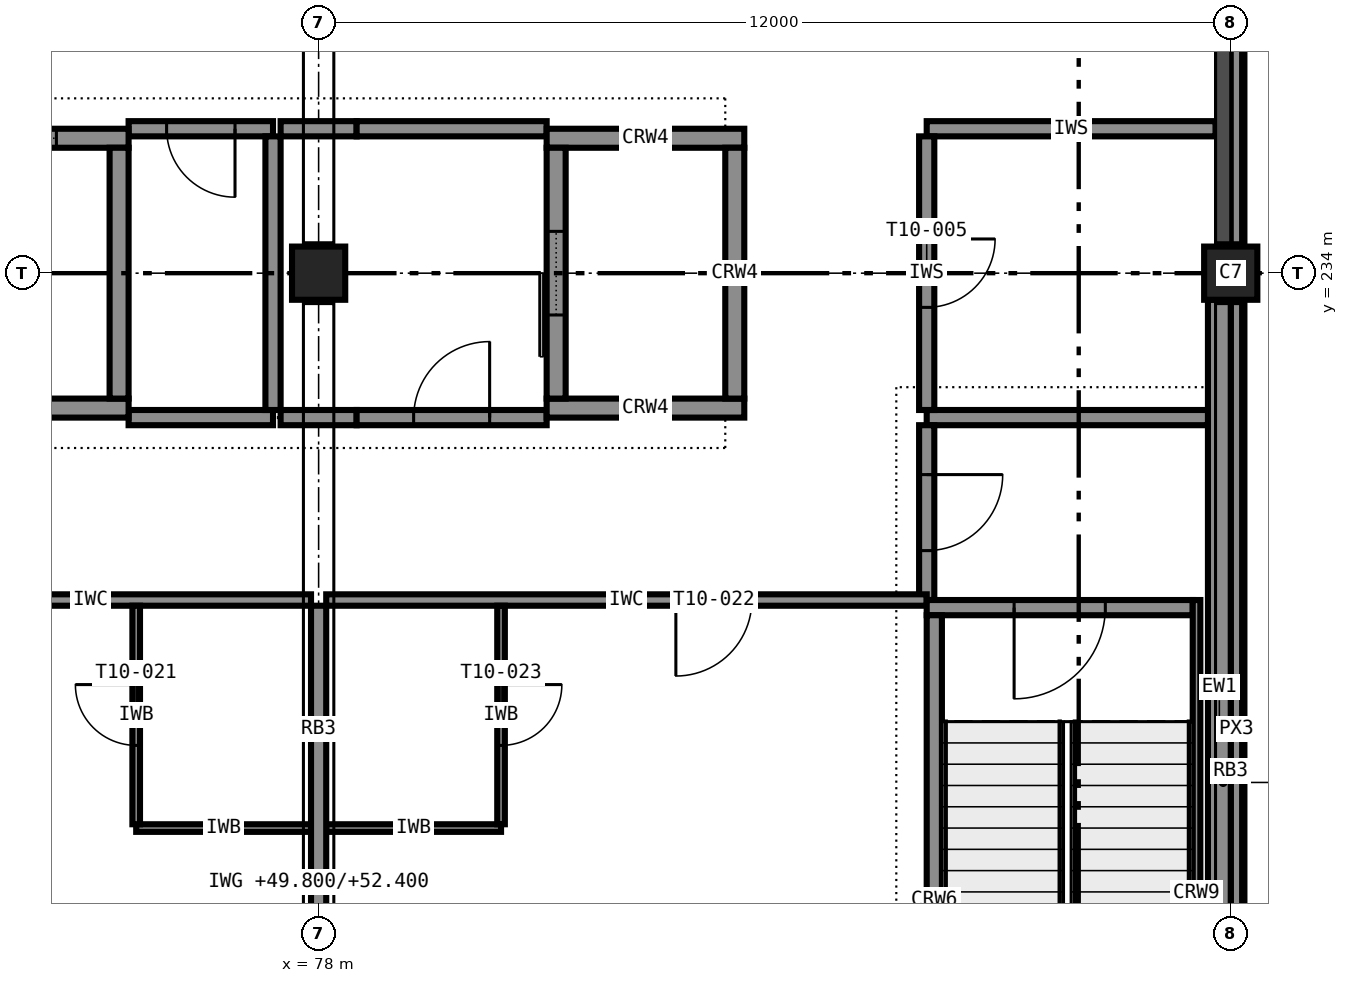
"""IFC4 building model, lengths in metres.
Left out: names, types, materials, properties, quantities, classifications, styles, units other than length and angle.
Written with IfcOpenShell. Run it as: python <this file> out.ifc"""

import sys

from ifc_helpers import new_model, si_unit, direction, frame, frame_2d, origin, origin_2d, place, context, subcontext, project, spatial, rectangle, extrude, element, fill, save


model = new_model("IFC4")
c1 = context("Model", 3, precision=1e-05, world=origin(), true_north=direction((0.0, 1.0)))
c2 = subcontext(c1, "Body", "Model", "MODEL_VIEW")
j1 = project(units=[si_unit("LENGTHUNIT", "METRE"), si_unit("PLANEANGLEUNIT", "RADIAN")], contexts=[c1])
p1 = place(None, origin())
s1 = spatial("IfcSite", under=j1, at=p1, CompositionType="ELEMENT")
p2 = place(p1, origin())
s2 = spatial("IfcBuilding", under=s1, at=p2, CompositionType="ELEMENT")
p3 = place(p2, frame((0.0, 0.0, 49.8)))
s3 = spatial("IfcBuildingStorey", under=s2, at=p3, CompositionType="ELEMENT", Elevation=49.8)
for number, where, z_axis, x_axis in (
    (1, (78.0, 234.0, 0.0), (0.0, 0.0, 1.0), (1.0, 0.0, 0.0)),
    (2, (90.0, 234.0, 0.0), (0.0, 0.0, 1.0), (1.0, 0.0, 0.0)),
):
    element("IfcColumn", number, at=place(p3, frame(where, z_axis=z_axis, x_axis=x_axis)), inside=s3, PredefinedType="COLUMN", context=c2, shape_type="SweptSolid", body=[
        extrude(rectangle(XDim=0.7, YDim=0.7, at=origin_2d()), origin(), (0.0, 0.0, 1.0), 3.6),
    ])
p4 = place(p3, frame((72.5, 232.225, 0.0), z_axis=(0.0, 0.0, 1.0), x_axis=(1.0, 0.0, 0.0)))
e3 = element("IfcWall", 3, at=p4, inside=s3, PredefinedType="SHEAR", context=c2, shape_type="SweptSolid", body=[
    extrude(rectangle(XDim=3.0, YDim=0.25, at=frame_2d((1.5, 0.0))), origin(), (0.0, 0.0, 1.0), 3.6),
])
p5 = place(p3, frame((72.5, 235.775, 0.0), z_axis=(0.0, 0.0, 1.0), x_axis=(1.0, 0.0, 0.0)))
e4 = element("IfcWall", 4, at=p5, inside=s3, PredefinedType="SHEAR", context=c2, shape_type="SweptSolid", body=[
    extrude(rectangle(XDim=3.0, YDim=0.25, at=frame_2d((1.5, 0.0))), origin(), (0.0, 0.0, 1.0), 3.6),
])
p6 = place(p5, frame((0.95, 0.0, 0.0)))
e5 = element("IfcOpeningElement", 5, at=p6, cuts=e4, PredefinedType="OPENING", context=c2, shape_type="SweptSolid", body=[
    extrude(rectangle(XDim=1.1, YDim=2.1, at=frame_2d((0.55, 1.05))), frame((0.0, 0.135, 0.0), z_axis=(0.0, -1.0, 0.0), x_axis=(1.0, 0.0, 0.0)), (0.0, 0.0, 1.0), 0.27),
])
p7 = place(p3, frame((75.375, 232.35, 0.0), z_axis=(0.0, 0.0, 1.0), x_axis=(0.0, 1.0, 0.0)))
e6 = element("IfcWall", 6, at=p7, inside=s3, PredefinedType="SHEAR", context=c2, shape_type="SweptSolid", body=[
    extrude(rectangle(XDim=3.3, YDim=0.25, at=frame_2d((1.65, 0.0))), origin(), (0.0, 0.0, 1.0), 3.6),
])
for number, where, z_axis, x_axis in (
    (7, (81.0, 232.225, 0.0), (0.0, 0.0, 1.0), (1.0, 0.0, 0.0)),
    (8, (81.0, 235.775, 0.0), (0.0, 0.0, 1.0), (1.0, 0.0, 0.0)),
):
    element("IfcWall", number, at=place(p3, frame(where, z_axis=z_axis, x_axis=x_axis)), inside=s3, PredefinedType="SHEAR", context=c2, shape_type="SweptSolid", body=[
        extrude(rectangle(XDim=2.6, YDim=0.25, at=frame_2d((1.3, 0.0))), origin(), (0.0, 0.0, 1.0), 3.6),
    ])
p8 = place(p3, frame((81.125, 232.35, 0.0), z_axis=(0.0, 0.0, 1.0), x_axis=(0.0, 1.0, 0.0)))
e9 = element("IfcWall", 9, at=p8, inside=s3, PredefinedType="SHEAR", context=c2, shape_type="SweptSolid", body=[
    extrude(rectangle(XDim=3.3, YDim=0.25, at=frame_2d((1.65, 0.0))), origin(), (0.0, 0.0, 1.0), 3.6),
])
p9 = place(p8, frame((1.1, 0.0, 0.0)))
e10 = element("IfcOpeningElement", 10, at=p9, cuts=e9, PredefinedType="OPENING", context=c2, shape_type="SweptSolid", body=[
    extrude(rectangle(XDim=1.1, YDim=2.1, at=frame_2d((0.55, 1.05))), frame((0.0, 0.135, 0.0), z_axis=(0.0, -1.0, 0.0), x_axis=(1.0, 0.0, 0.0)), (0.0, 0.0, 1.0), 0.27),
])
p10 = place(p3, frame((83.475, 232.35, 0.0), z_axis=(0.0, 0.0, 1.0), x_axis=(0.0, 1.0, 0.0)))
e11 = element("IfcWall", 11, at=p10, inside=s3, PredefinedType="SHEAR", context=c2, shape_type="SweptSolid", body=[
    extrude(rectangle(XDim=3.3, YDim=0.25, at=frame_2d((1.65, 0.0))), origin(), (0.0, 0.0, 1.0), 3.6),
])
p11 = place(p3, frame((89.5, 229.6, 0.0), z_axis=(0.0, 0.0, 1.0), x_axis=(-1.0, 0.0, 0.0)))
e12 = element("IfcWall", 12, at=p11, inside=s3, PredefinedType="SHEAR", context=c2, shape_type="SweptSolid", body=[
    extrude(rectangle(XDim=3.5, YDim=0.2, at=frame_2d((1.75, 0.0))), origin(), (0.0, 0.0, 1.0), 3.6),
])
p12 = place(p11, frame((1.15, 0.0, 0.0)))
e13 = element("IfcOpeningElement", 13, at=p12, cuts=e12, PredefinedType="OPENING", context=c2, shape_type="SweptSolid", body=[
    extrude(rectangle(XDim=1.2, YDim=2.1, at=frame_2d((0.6, 1.05))), frame((0.0, 0.11, 0.0), z_axis=(0.0, -1.0, 0.0), x_axis=(1.0, 0.0, 0.0)), (0.0, 0.0, 1.0), 0.22),
])
p13 = place(p3, frame((86.1, 222.0, 0.0), z_axis=(0.0, 0.0, 1.0), x_axis=(0.0, 1.0, 0.0)))
e14 = element("IfcWall", 14, at=p13, inside=s3, PredefinedType="SHEAR", context=c2, shape_type="SweptSolid", body=[
    extrude(rectangle(XDim=7.5, YDim=0.2, at=frame_2d((3.75, 0.0))), origin(), (0.0, 0.0, 1.0), 3.6),
])
p14 = place(p3, frame((89.55, 229.7, 0.0), z_axis=(0.0, 0.0, 1.0), x_axis=(0.0, -1.0, 0.0)))
e15 = element("IfcWall", 15, at=p14, inside=s3, PredefinedType="SHEAR", context=c2, shape_type="SweptSolid", body=[
    extrude(rectangle(XDim=7.7, YDim=0.1, at=frame_2d((3.85, 0.0))), origin(), (0.0, 0.0, 1.0), 3.4),
])
p15 = place(p3, frame((89.85, 222.35, 0.0), z_axis=(0.0, 0.0, 1.0), x_axis=(0.0, 1.0, 0.0)))
e16 = element("IfcWall", 16, at=p15, inside=s3, PredefinedType="STANDARD", context=c2, shape_type="SweptSolid", body=[
    extrude(rectangle(XDim=11.3, YDim=0.3, at=frame_2d((5.65, 0.0))), origin(), (0.0, 0.0, 1.0), 2.6),
])
for number, where, z_axis, x_axis in (
    (17, (90.075, 222.35, 3.4), (0.0, 0.0, 1.0), (0.0, 1.0, 0.0)),
    (18, (90.075, 234.35, 3.4), (0.0, 0.0, 1.0), (0.0, 1.0, 0.0)),
):
    element("IfcWall", number, at=place(p3, frame(where, z_axis=z_axis, x_axis=x_axis)), inside=s3, PredefinedType="STANDARD", context=c2, shape_type="SweptSolid", body=[
        extrude(rectangle(XDim=11.3, YDim=0.15, at=frame_2d((5.65, 0.0))), origin(), (0.0, 0.0, 1.0), 0.2),
    ])
p16 = place(p3, frame((75.5, 232.1, 0.0), z_axis=(0.0, 0.0, 1.0), x_axis=(1.0, 0.0, 0.0)))
e19 = element("IfcWall", 19, at=p16, inside=s3, PredefinedType="PARTITIONING", context=c2, shape_type="SweptSolid", body=[
    extrude(rectangle(XDim=1.9, YDim=0.2, at=frame_2d((0.95, 0.0))), origin(), (0.0, 0.0, 1.0), 3.4),
])
p17 = place(p3, frame((77.5, 232.1, 0.0), z_axis=(0.0, 0.0, 1.0), x_axis=(1.0, 0.0, 0.0)))
e20 = element("IfcWall", 20, at=p17, inside=s3, PredefinedType="PARTITIONING", context=c2, shape_type="SweptSolid", body=[
    extrude(rectangle(XDim=1.0, YDim=0.2, at=frame_2d((0.5, 0.0))), origin(), (0.0, 0.0, 1.0), 3.4),
])
p18 = place(p3, frame((78.5, 232.1, 0.0), z_axis=(0.0, 0.0, 1.0), x_axis=(1.0, 0.0, 0.0)))
e21 = element("IfcWall", 21, at=p18, inside=s3, PredefinedType="PARTITIONING", context=c2, shape_type="SweptSolid", body=[
    extrude(rectangle(XDim=2.5, YDim=0.2, at=frame_2d((1.25, 0.0))), origin(), (0.0, 0.0, 1.0), 3.4),
])
p19 = place(p18, frame((0.75, 0.0, 0.0)))
e22 = element("IfcOpeningElement", 22, at=p19, cuts=e21, PredefinedType="OPENING", context=c2, shape_type="SweptSolid", body=[
    extrude(rectangle(XDim=1.0, YDim=2.1, at=frame_2d((0.5, 1.05))), frame((0.0, 0.11, 0.0), z_axis=(0.0, -1.0, 0.0), x_axis=(1.0, 0.0, 0.0)), (0.0, 0.0, 1.0), 0.22),
])
p20 = place(p3, frame((86.0, 232.1, 0.0), z_axis=(0.0, 0.0, 1.0), x_axis=(1.0, 0.0, 0.0)))
e23 = element("IfcWall", 23, at=p20, inside=s3, PredefinedType="PARTITIONING", context=c2, shape_type="SweptSolid", body=[
    extrude(rectangle(XDim=3.7, YDim=0.2, at=frame_2d((1.85, 0.0))), origin(), (0.0, 0.0, 1.0), 3.4),
])
p21 = place(p3, frame((77.4, 235.9, 0.0), z_axis=(0.0, 0.0, 1.0), x_axis=(-1.0, 0.0, 0.0)))
e24 = element("IfcWall", 24, at=p21, inside=s3, PredefinedType="PARTITIONING", context=c2, shape_type="SweptSolid", body=[
    extrude(rectangle(XDim=1.9, YDim=0.2, at=frame_2d((0.95, 0.0))), origin(), (0.0, 0.0, 1.0), 3.4),
])
p22 = place(p21, frame((0.5, 0.0, 0.0)))
e25 = element("IfcOpeningElement", 25, at=p22, cuts=e24, PredefinedType="OPENING", context=c2, shape_type="SweptSolid", body=[
    extrude(rectangle(XDim=0.9, YDim=2.1, at=frame_2d((0.45, 1.05))), frame((0.0, 0.11, 0.0), z_axis=(0.0, -1.0, 0.0), x_axis=(1.0, 0.0, 0.0)), (0.0, 0.0, 1.0), 0.22),
])
p23 = place(p3, frame((77.5, 235.9, 0.0), z_axis=(0.0, 0.0, 1.0), x_axis=(1.0, 0.0, 0.0)))
e26 = element("IfcWall", 26, at=p23, inside=s3, PredefinedType="PARTITIONING", context=c2, shape_type="SweptSolid", body=[
    extrude(rectangle(XDim=1.0, YDim=0.2, at=frame_2d((0.5, 0.0))), origin(), (0.0, 0.0, 1.0), 3.4),
])
p24 = place(p3, frame((78.5, 235.9, 0.0), z_axis=(0.0, 0.0, 1.0), x_axis=(1.0, 0.0, 0.0)))
e27 = element("IfcWall", 27, at=p24, inside=s3, PredefinedType="PARTITIONING", context=c2, shape_type="SweptSolid", body=[
    extrude(rectangle(XDim=2.5, YDim=0.2, at=frame_2d((1.25, 0.0))), origin(), (0.0, 0.0, 1.0), 3.4),
])
p25 = place(p3, frame((86.0, 235.9, 0.0), z_axis=(0.0, 0.0, 1.0), x_axis=(1.0, 0.0, 0.0)))
e28 = element("IfcWall", 28, at=p25, inside=s3, PredefinedType="PARTITIONING", context=c2, shape_type="SweptSolid", body=[
    extrude(rectangle(XDim=3.8, YDim=0.2, at=frame_2d((1.9, 0.0))), origin(), (0.0, 0.0, 1.0), 3.4),
])
p26 = place(p3, frame((77.4, 232.2, 0.0), z_axis=(0.0, 0.0, 1.0), x_axis=(0.0, 1.0, 0.0)))
e29 = element("IfcWall", 29, at=p26, inside=s3, PredefinedType="PARTITIONING", context=c2, shape_type="SweptSolid", body=[
    extrude(rectangle(XDim=3.6, YDim=0.2, at=frame_2d((1.8, 0.0))), origin(), (0.0, 0.0, 1.0), 3.4),
])
p27 = place(p3, frame((86.0, 235.8, 0.0), z_axis=(0.0, 0.0, 1.0), x_axis=(0.0, -1.0, 0.0)))
e30 = element("IfcWall", 30, at=p27, inside=s3, PredefinedType="PARTITIONING", context=c2, shape_type="SweptSolid", body=[
    extrude(rectangle(XDim=3.6, YDim=0.2, at=frame_2d((1.8, 0.0))), origin(), (0.0, 0.0, 1.0), 3.4),
])
p28 = place(p27, frame((1.35, 0.0, 0.0)))
e31 = element("IfcOpeningElement", 31, at=p28, cuts=e30, PredefinedType="OPENING", context=c2, shape_type="SweptSolid", body=[
    extrude(rectangle(XDim=0.9, YDim=2.1, at=frame_2d((0.45, 1.05))), frame((0.0, 0.11, 0.0), z_axis=(0.0, -1.0, 0.0), x_axis=(1.0, 0.0, 0.0)), (0.0, 0.0, 1.0), 0.22),
])
p29 = place(p3, frame((86.0, 232.0, 0.0), z_axis=(0.0, 0.0, 1.0), x_axis=(0.0, -1.0, 0.0)))
e32 = element("IfcWall", 32, at=p29, inside=s3, PredefinedType="PARTITIONING", context=c2, shape_type="SweptSolid", body=[
    extrude(rectangle(XDim=2.3, YDim=0.2, at=frame_2d((1.15, 0.0))), origin(), (0.0, 0.0, 1.0), 3.4),
])
p30 = place(p29, frame((0.65, 0.0, 0.0)))
e33 = element("IfcOpeningElement", 33, at=p30, cuts=e32, PredefinedType="OPENING", context=c2, shape_type="SweptSolid", body=[
    extrude(rectangle(XDim=1.0, YDim=2.1, at=frame_2d((0.5, 1.05))), frame((0.0, 0.11, 0.0), z_axis=(0.0, -1.0, 0.0), x_axis=(1.0, 0.0, 0.0)), (0.0, 0.0, 1.0), 0.22),
])
p31 = place(p3, frame((77.9, 229.7, 0.0), z_axis=(0.0, 0.0, 1.0), x_axis=(-1.0, 0.0, 0.0)))
e34 = element("IfcWall", 34, at=p31, inside=s3, PredefinedType="PARTITIONING", context=c2, shape_type="SweptSolid", body=[
    extrude(rectangle(XDim=5.8, YDim=0.15, at=frame_2d((2.9, 0.0))), origin(), (0.0, 0.0, 1.0), 3.4),
])
p32 = place(p31, frame((3.6, 0.0, 0.0)))
e35 = element("IfcOpeningElement", 35, at=p32, cuts=e34, PredefinedType="OPENING", context=c2, shape_type="SweptSolid", body=[
    extrude(rectangle(XDim=1.0, YDim=2.1, at=frame_2d((0.5, 1.05))), frame((0.0, 0.085, 0.0), z_axis=(0.0, -1.0, 0.0), x_axis=(1.0, 0.0, 0.0)), (0.0, 0.0, 1.0), 0.17),
])
p33 = place(p3, frame((75.6, 226.7, 0.0), z_axis=(0.0, 0.0, 1.0), x_axis=(1.0, 0.0, 0.0)))
e36 = element("IfcWall", 36, at=p33, inside=s3, PredefinedType="PARTITIONING", context=c2, shape_type="SweptSolid", body=[
    extrude(rectangle(XDim=2.3, YDim=0.1, at=frame_2d((1.15, 0.0))), origin(), (0.0, 0.0, 1.0), 3.4),
])
p34 = place(p3, frame((75.6, 226.75, 0.0), z_axis=(0.0, 0.0, 1.0), x_axis=(0.0, 1.0, 0.0)))
e37 = element("IfcWall", 37, at=p34, inside=s3, PredefinedType="PARTITIONING", context=c2, shape_type="SweptSolid", body=[
    extrude(rectangle(XDim=2.875, YDim=0.1, at=frame_2d((1.438, 0.0))), origin(), (0.0, 0.0, 1.0), 3.4),
])
p35 = place(p34, frame((1.038, 0.0, 0.0)))
e38 = element("IfcOpeningElement", 38, at=p35, cuts=e37, PredefinedType="OPENING", context=c2, shape_type="SweptSolid", body=[
    extrude(rectangle(XDim=0.8, YDim=2.1, at=frame_2d((0.4, 1.05))), frame((0.0, 0.06, 0.0), z_axis=(0.0, -1.0, 0.0), x_axis=(1.0, 0.0, 0.0)), (0.0, 0.0, 1.0), 0.12),
])
p36 = place(p3, frame((86.0, 229.7, 0.0), z_axis=(0.0, 0.0, 1.0), x_axis=(-1.0, 0.0, 0.0)))
e39 = element("IfcWall", 39, at=p36, inside=s3, PredefinedType="PARTITIONING", context=c2, shape_type="SweptSolid", body=[
    extrude(rectangle(XDim=7.9, YDim=0.15, at=frame_2d((3.95, 0.0))), origin(), (0.0, 0.0, 1.0), 3.4),
])
p37 = place(p36, frame((2.3, 0.0, 0.0)))
e40 = element("IfcOpeningElement", 40, at=p37, cuts=e39, PredefinedType="OPENING", context=c2, shape_type="SweptSolid", body=[
    extrude(rectangle(XDim=1.0, YDim=2.1, at=frame_2d((0.5, 1.05))), frame((0.0, 0.085, 0.0), z_axis=(0.0, -1.0, 0.0), x_axis=(1.0, 0.0, 0.0)), (0.0, 0.0, 1.0), 0.17),
])
p38 = place(p3, frame((78.1, 226.7, 0.0), z_axis=(0.0, 0.0, 1.0), x_axis=(1.0, 0.0, 0.0)))
e41 = element("IfcWall", 41, at=p38, inside=s3, PredefinedType="PARTITIONING", context=c2, shape_type="SweptSolid", body=[
    extrude(rectangle(XDim=2.3, YDim=0.1, at=frame_2d((1.15, 0.0))), origin(), (0.0, 0.0, 1.0), 3.4),
])
p39 = place(p3, frame((80.4, 229.625, 0.0), z_axis=(0.0, 0.0, 1.0), x_axis=(0.0, -1.0, 0.0)))
e42 = element("IfcWall", 42, at=p39, inside=s3, PredefinedType="PARTITIONING", context=c2, shape_type="SweptSolid", body=[
    extrude(rectangle(XDim=2.875, YDim=0.1, at=frame_2d((1.438, 0.0))), origin(), (0.0, 0.0, 1.0), 3.4),
])
p40 = place(p39, frame((1.038, 0.0, 0.0)))
e43 = element("IfcOpeningElement", 43, at=p40, cuts=e42, PredefinedType="OPENING", context=c2, shape_type="SweptSolid", body=[
    extrude(rectangle(XDim=0.8, YDim=2.1, at=frame_2d((0.4, 1.05))), frame((0.0, 0.06, 0.0), z_axis=(0.0, -1.0, 0.0), x_axis=(1.0, 0.0, 0.0)), (0.0, 0.0, 1.0), 0.12),
])
p41 = place(p3, frame((78.0, 222.35, 0.0), z_axis=(0.0, 0.0, 1.0), x_axis=(0.0, 1.0, 0.0)))
e44 = element("IfcWall", 44, at=p41, inside=s3, PredefinedType="PARTITIONING", context=c2, shape_type="SweptSolid", body=[
    extrude(rectangle(XDim=7.275, YDim=0.2, at=frame_2d((3.637, 0.0))), origin(), (0.0, 0.0, 1.0), 2.6),
])
p42 = place(p22, origin())
e45 = element("IfcDoor", 45, at=p42, inside=s3, OperationType="SINGLE_SWING_LEFT", PredefinedType="DOOR", context=c2, shape_type="SweptSolid", body=[
    extrude(rectangle(XDim=0.9, YDim=2.1, at=frame_2d((0.45, 1.05))), frame((0.0, 0.025, 0.0), z_axis=(0.0, -1.0, 0.0), x_axis=(1.0, 0.0, 0.0)), (0.0, 0.0, 1.0), 0.05),
])
fill(e25, e45)
p43 = place(p19, origin())
e46 = element("IfcDoor", 46, at=p43, inside=s3, OperationType="SINGLE_SWING_RIGHT", PredefinedType="DOOR", context=c2, shape_type="SweptSolid", body=[
    extrude(rectangle(XDim=1.0, YDim=2.1, at=frame_2d((0.5, 1.05))), frame((0.0, 0.025, 0.0), z_axis=(0.0, -1.0, 0.0), x_axis=(1.0, 0.0, 0.0)), (0.0, 0.0, 1.0), 0.05),
])
fill(e22, e46)
p44 = place(p28, origin())
e47 = element("IfcDoor", 47, at=p44, inside=s3, OperationType="SINGLE_SWING_LEFT", PredefinedType="DOOR", context=c2, shape_type="SweptSolid", body=[
    extrude(rectangle(XDim=0.9, YDim=2.1, at=frame_2d((0.45, 1.05))), frame((0.0, 0.025, 0.0), z_axis=(0.0, -1.0, 0.0), x_axis=(1.0, 0.0, 0.0)), (0.0, 0.0, 1.0), 0.05),
])
fill(e31, e47)
p45 = place(p30, origin())
e48 = element("IfcDoor", 48, at=p45, inside=s3, OperationType="SINGLE_SWING_LEFT", PredefinedType="DOOR", context=c2, shape_type="SweptSolid", body=[
    extrude(rectangle(XDim=1.0, YDim=2.1, at=frame_2d((0.5, 1.05))), frame((0.0, 0.025, 0.0), z_axis=(0.0, -1.0, 0.0), x_axis=(1.0, 0.0, 0.0)), (0.0, 0.0, 1.0), 0.05),
])
fill(e33, e48)
p46 = place(p35, origin())
e49 = element("IfcDoor", 49, at=p46, inside=s3, OperationType="SINGLE_SWING_RIGHT", PredefinedType="DOOR", context=c2, shape_type="SweptSolid", body=[
    extrude(rectangle(XDim=0.8, YDim=2.1, at=frame_2d((0.4, 1.05))), frame((0.0, 0.025, 0.0), z_axis=(0.0, -1.0, 0.0), x_axis=(1.0, 0.0, 0.0)), (0.0, 0.0, 1.0), 0.05),
])
fill(e38, e49)
p47 = place(p37, origin())
e50 = element("IfcDoor", 50, at=p47, inside=s3, OperationType="SINGLE_SWING_RIGHT", PredefinedType="DOOR", context=c2, shape_type="SweptSolid", body=[
    extrude(rectangle(XDim=1.0, YDim=2.1, at=frame_2d((0.5, 1.05))), frame((0.0, 0.025, 0.0), z_axis=(0.0, -1.0, 0.0), x_axis=(1.0, 0.0, 0.0)), (0.0, 0.0, 1.0), 0.05),
])
fill(e40, e50)
p48 = place(p40, origin())
e51 = element("IfcDoor", 51, at=p48, inside=s3, OperationType="SINGLE_SWING_LEFT", PredefinedType="DOOR", context=c2, shape_type="SweptSolid", body=[
    extrude(rectangle(XDim=0.8, YDim=2.1, at=frame_2d((0.4, 1.05))), frame((0.0, 0.025, 0.0), z_axis=(0.0, -1.0, 0.0), x_axis=(1.0, 0.0, 0.0)), (0.0, 0.0, 1.0), 0.05),
])
fill(e43, e51)
p49 = place(p6, origin())
e52 = element("IfcDoor", 52, at=p49, inside=s3, OperationType="SLIDING_TO_LEFT", PredefinedType="DOOR", context=c2, shape_type="SweptSolid", body=[
    extrude(rectangle(XDim=1.1, YDim=2.1, at=frame_2d((0.55, 1.05))), frame((0.0, 0.025, 0.0), z_axis=(0.0, -1.0, 0.0), x_axis=(1.0, 0.0, 0.0)), (0.0, 0.0, 1.0), 0.05),
])
fill(e5, e52)
p50 = place(p9, origin())
e53 = element("IfcDoor", 53, at=p50, inside=s3, OperationType="SLIDING_TO_LEFT", PredefinedType="DOOR", context=c2, shape_type="SweptSolid", body=[
    extrude(rectangle(XDim=1.1, YDim=2.1, at=frame_2d((0.55, 1.05))), frame((0.0, 0.025, 0.0), z_axis=(0.0, -1.0, 0.0), x_axis=(1.0, 0.0, 0.0)), (0.0, 0.0, 1.0), 0.05),
])
fill(e10, e53)
p51 = place(p12, origin())
e54 = element("IfcDoor", 54, at=p51, inside=s3, OperationType="SINGLE_SWING_RIGHT", PredefinedType="DOOR", context=c2, shape_type="SweptSolid", body=[
    extrude(rectangle(XDim=1.2, YDim=2.1, at=frame_2d((0.6, 1.05))), frame((0.0, 0.025, 0.0), z_axis=(0.0, -1.0, 0.0), x_axis=(1.0, 0.0, 0.0)), (0.0, 0.0, 1.0), 0.05),
])
fill(e13, e54)
save(model, sys.argv[1])
